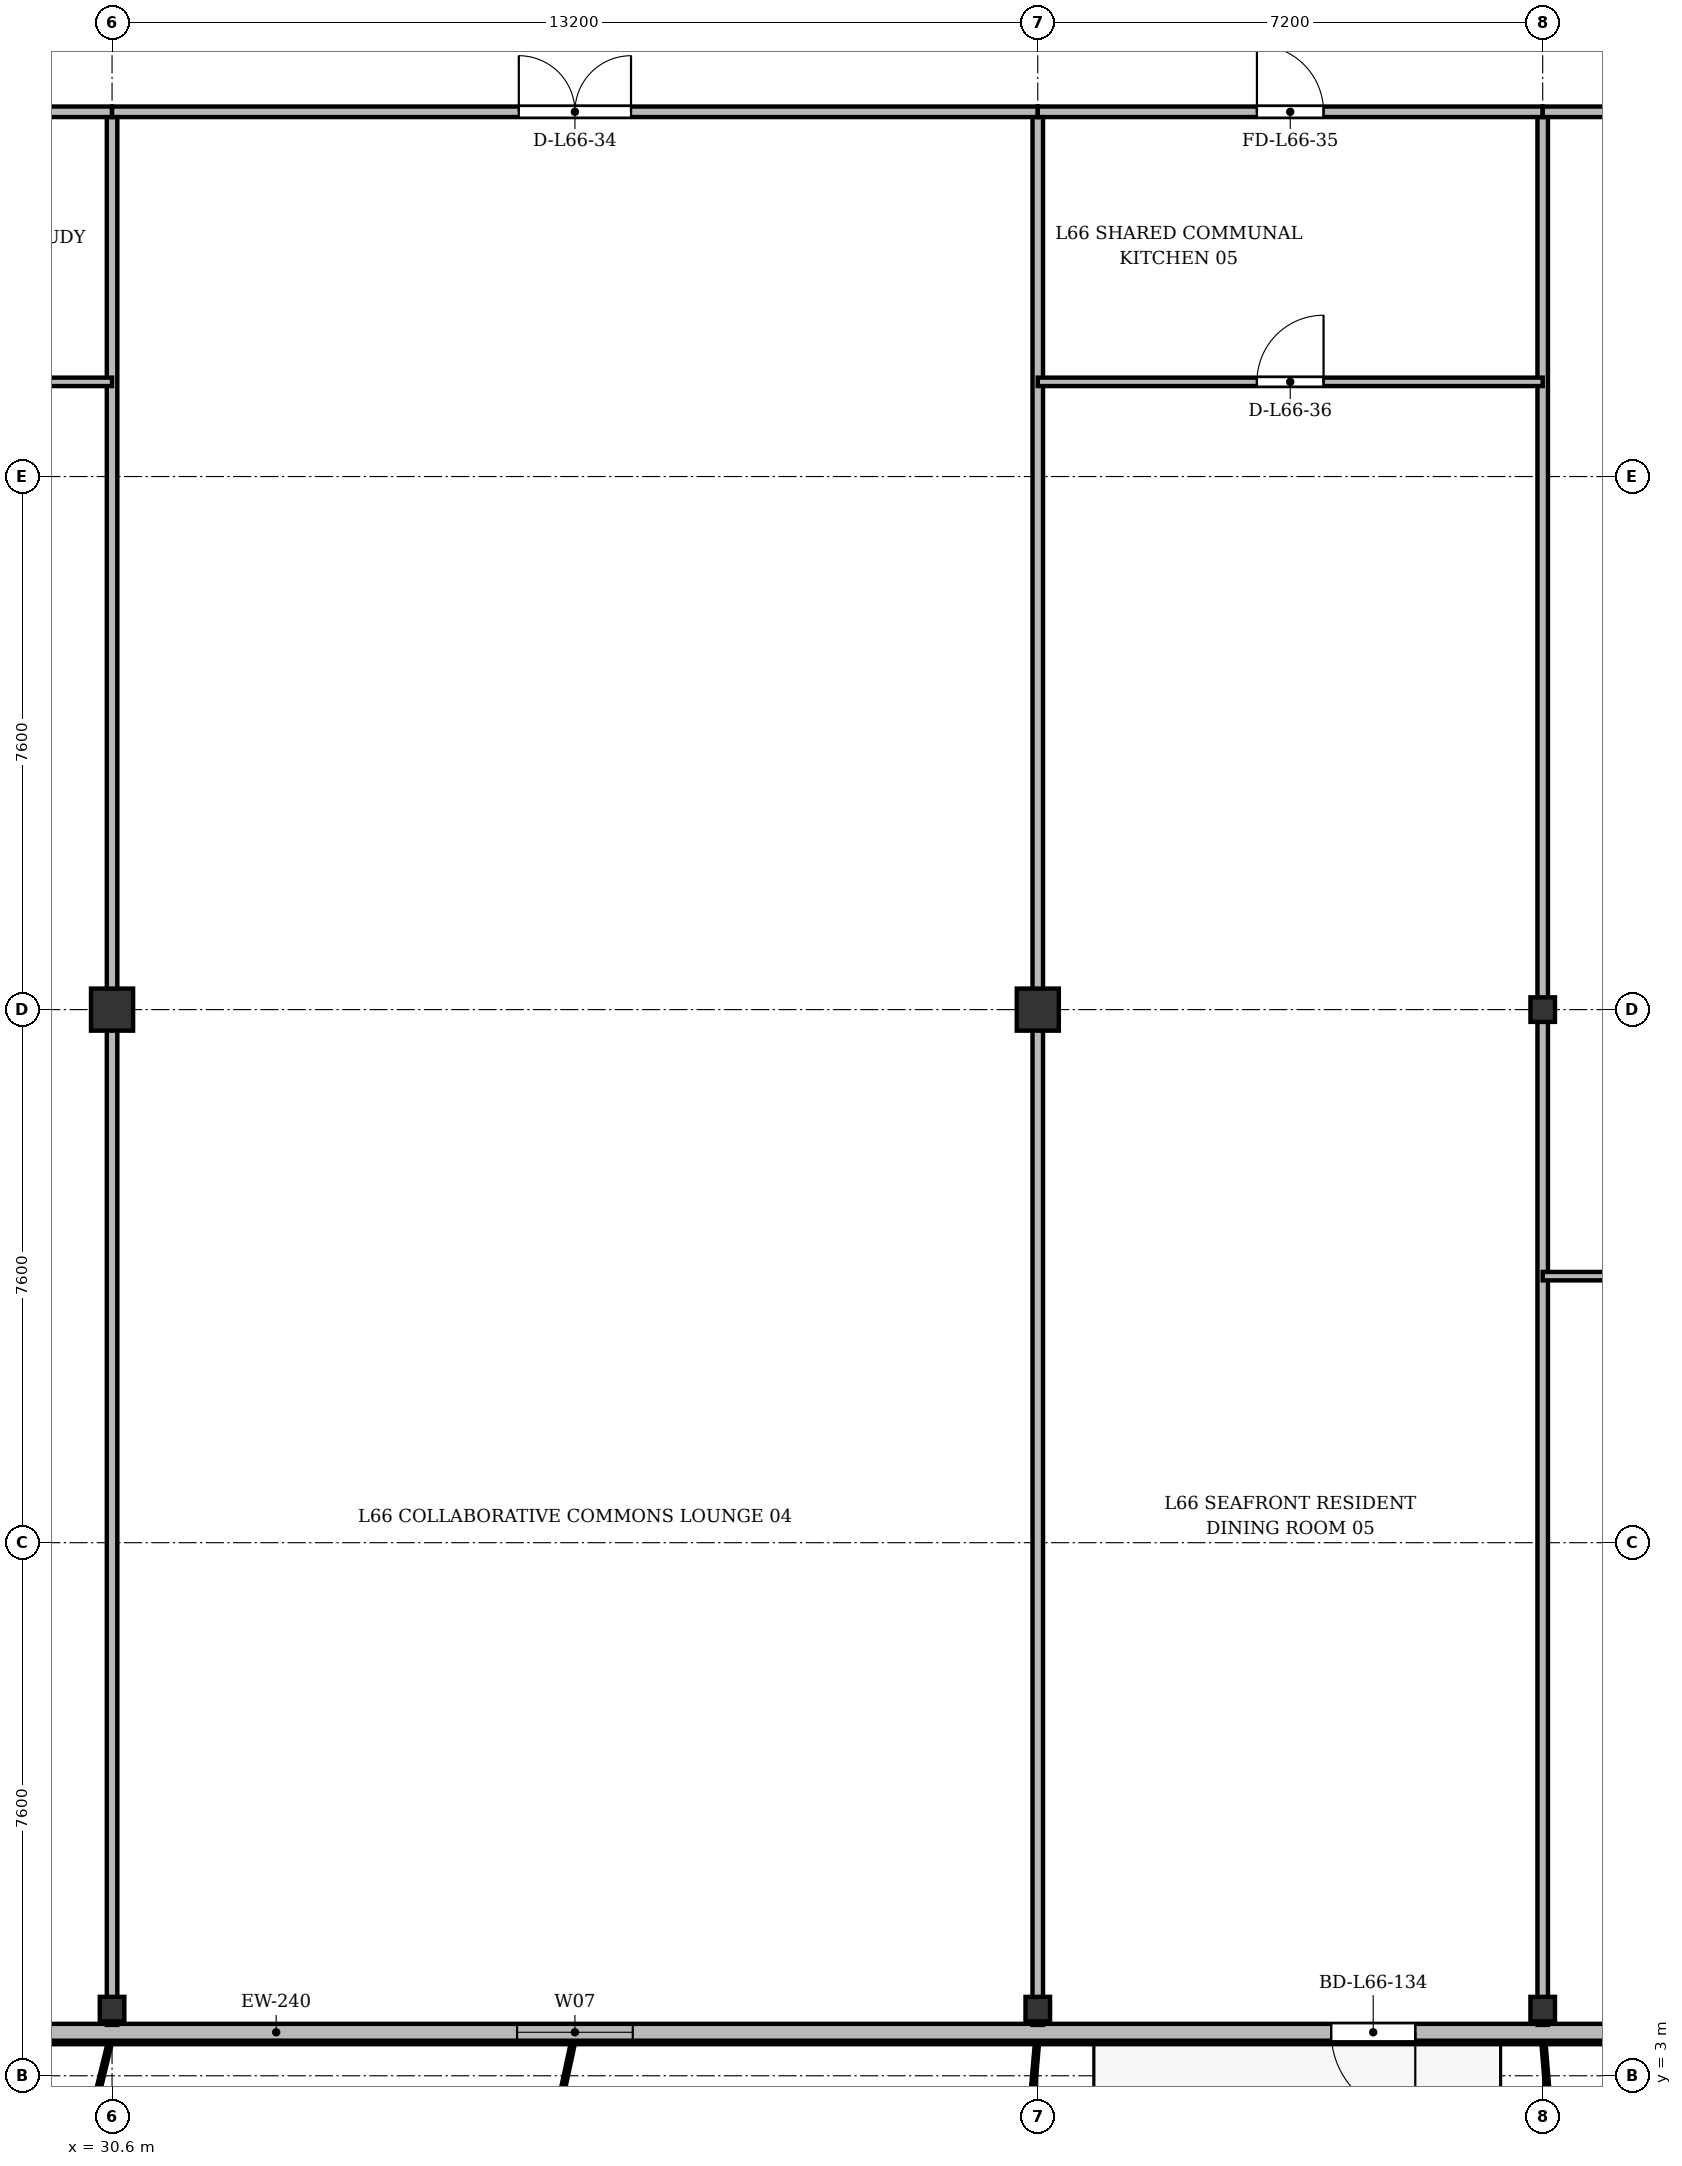
"""IFC4 building model, lengths in metres.
Left out: names, types, materials, properties, quantities, classifications, styles, units other than length and angle.
Written with IfcOpenShell. Run it as: python <this file> out.ifc"""

import sys

from ifc_helpers import new_model, si_unit, direction, frame, frame_2d, origin, origin_2d, place, context, subcontext, project, spatial, rectangle, i_section, extrude, source, transform, mapped, element, fill, save


model = new_model("IFC4")
c1 = context("Model", 3, precision=1e-05, world=origin(), true_north=direction((0.0, 1.0)))
c2 = subcontext(c1, "Body", "Model", "MODEL_VIEW")
j1 = project(units=[si_unit("LENGTHUNIT", "METRE"), si_unit("PLANEANGLEUNIT", "RADIAN")], contexts=[c1])
p1 = place(None, origin())
s1 = spatial("IfcSite", under=j1, at=p1, CompositionType="ELEMENT")
p2 = place(p1, origin())
s2 = spatial("IfcBuilding", under=s1, at=p2, CompositionType="ELEMENT")
p3 = place(p2, frame((0.0, 0.0, 255.9)))
s3 = spatial("IfcBuildingStorey", under=s2, at=p3, CompositionType="ELEMENT", Elevation=255.9)
m1 = source(origin(), c2, "Body", "SweptSolid", [
    extrude(i_section(OverallWidth=0.35, OverallDepth=0.35, WebThickness=0.018, FlangeThickness=0.028, at=origin_2d()), origin(), (0.0, 0.0, 1.0), 3.6),
])
p4 = place(p3, frame((30.6, 3.95, 0.0), z_axis=(0.0, 0.0, 1.0), x_axis=(1.0, 0.0, 0.0)))
e1 = element("IfcColumn", 1, at=p4, inside=s3, PredefinedType="COLUMN", context=c2, shape_type="MappedRepresentation", body=[
    mapped(m1, transform((0.0, 0.0, 0.0), x_axis=(1.0, 0.0, 0.0), y_axis=(0.0, 1.0, 0.0), z_axis=(0.0, 0.0, 1.0), scale=1.0)),
])
m2 = source(origin(), c2, "Body", "SweptSolid", [
    extrude(rectangle(XDim=0.6, YDim=0.6, at=origin_2d()), origin(), (0.0, 0.0, 1.0), 3.6),
])
p5 = place(p3, frame((30.6, 18.2, 0.0), z_axis=(0.0, 0.0, 1.0), x_axis=(1.0, 0.0, 0.0)))
e2 = element("IfcColumn", 2, at=p5, inside=s3, PredefinedType="COLUMN", context=c2, shape_type="MappedRepresentation", body=[
    mapped(m2, transform((0.0, 0.0, 0.0), x_axis=(1.0, 0.0, 0.0), y_axis=(0.0, 1.0, 0.0), z_axis=(0.0, 0.0, 1.0), scale=1.0)),
])
p6 = place(p3, frame((43.8, 3.95, 0.0), z_axis=(0.0, 0.0, 1.0), x_axis=(1.0, 0.0, 0.0)))
e3 = element("IfcColumn", 3, at=p6, inside=s3, PredefinedType="COLUMN", context=c2, shape_type="MappedRepresentation", body=[
    mapped(m1, transform((0.0, 0.0, 0.0), x_axis=(1.0, 0.0, 0.0), y_axis=(0.0, 1.0, 0.0), z_axis=(0.0, 0.0, 1.0), scale=1.0)),
])
p7 = place(p3, frame((43.8, 18.2, 0.0), z_axis=(0.0, 0.0, 1.0), x_axis=(1.0, 0.0, 0.0)))
e4 = element("IfcColumn", 4, at=p7, inside=s3, PredefinedType="COLUMN", context=c2, shape_type="MappedRepresentation", body=[
    mapped(m2, transform((0.0, 0.0, 0.0), x_axis=(1.0, 0.0, 0.0), y_axis=(0.0, 1.0, 0.0), z_axis=(0.0, 0.0, 1.0), scale=1.0)),
])
for number, where, z_axis, x_axis in (
    (5, (51.0, 3.95, 0.0), (0.0, 0.0, 1.0), (1.0, 0.0, 0.0)),
    (6, (51.0, 18.2, 0.0), (0.0, 0.0, 1.0), (1.0, 0.0, 0.0)),
):
    element("IfcColumn", number, at=place(p3, frame(where, z_axis=z_axis, x_axis=x_axis)), inside=s3, PredefinedType="COLUMN", context=c2, shape_type="MappedRepresentation", body=[
        mapped(m1, transform((0.0, 0.0, 0.0), x_axis=(1.0, 0.0, 0.0), y_axis=(0.0, 1.0, 0.0), z_axis=(0.0, 0.0, 1.0), scale=1.0)),
    ])
p8 = place(p3, frame((63.2, 3.62, 0.0), z_axis=(0.0, 0.0, 1.0), x_axis=(-1.0, 0.0, 0.0)))
e7 = element("IfcWall", 7, at=p8, inside=s3, PredefinedType="SOLIDWALL", context=c2, shape_type="SweptSolid", body=[
    extrude(rectangle(XDim=52.0, YDim=0.24, at=frame_2d((26.0, 0.0))), origin(), (0.0, 0.0, 1.0), 3.37),
])
p9 = place(p8, frame((1.145, 0.0, 0.9)))
e8 = element("IfcOpeningElement", 8, at=p9, cuts=e7, PredefinedType="OPENING", context=c2, shape_type="SweptSolid", body=[
    extrude(rectangle(XDim=2.2, YDim=1.8, at=frame_2d((1.1, 0.9))), frame((0.0, 0.13, 0.0), z_axis=(0.0, -1.0, 0.0), x_axis=(1.0, 0.0, 0.0)), (0.0, 0.0, 1.0), 0.26),
])
p10 = place(p8, frame((7.55, 0.0, 0.9)))
e9 = element("IfcOpeningElement", 9, at=p10, cuts=e7, PredefinedType="OPENING", context=c2, shape_type="SweptSolid", body=[
    extrude(rectangle(XDim=1.5, YDim=1.75, at=frame_2d((0.75, 0.875))), frame((0.0, 0.13, 0.0), z_axis=(0.0, -1.0, 0.0), x_axis=(1.0, 0.0, 0.0)), (0.0, 0.0, 1.0), 0.26),
])
p11 = place(p8, frame((14.017, 0.0, 0.0)))
e10 = element("IfcOpeningElement", 10, at=p11, cuts=e7, PredefinedType="OPENING", context=c2, shape_type="SweptSolid", body=[
    extrude(rectangle(XDim=1.2, YDim=2.2, at=frame_2d((0.6, 1.1))), frame((0.0, 0.13, 0.0), z_axis=(0.0, -1.0, 0.0), x_axis=(1.0, 0.0, 0.0)), (0.0, 0.0, 1.0), 0.26),
])
p12 = place(p8, frame((25.175, 0.0, 0.9)))
e11 = element("IfcOpeningElement", 11, at=p12, cuts=e7, PredefinedType="OPENING", context=c2, shape_type="SweptSolid", body=[
    extrude(rectangle(XDim=1.65, YDim=1.85, at=frame_2d((0.825, 0.925))), frame((0.0, 0.13, 0.0), z_axis=(0.0, -1.0, 0.0), x_axis=(1.0, 0.0, 0.0)), (0.0, 0.0, 1.0), 0.26),
])
p13 = place(p8, frame((35.3, 0.0, 0.9)))
e12 = element("IfcOpeningElement", 12, at=p13, cuts=e7, PredefinedType="OPENING", context=c2, shape_type="SweptSolid", body=[
    extrude(rectangle(XDim=1.8, YDim=1.8, at=frame_2d((0.9, 0.9))), frame((0.0, 0.13, 0.0), z_axis=(0.0, -1.0, 0.0), x_axis=(1.0, 0.0, 0.0)), (0.0, 0.0, 1.0), 0.26),
])
p14 = place(p8, frame((45.302, 0.0, 0.0)))
e13 = element("IfcOpeningElement", 13, at=p14, cuts=e7, PredefinedType="OPENING", context=c2, shape_type="SweptSolid", body=[
    extrude(rectangle(XDim=1.2, YDim=2.2, at=frame_2d((0.6, 1.1))), frame((0.0, 0.13, 0.0), z_axis=(0.0, -1.0, 0.0), x_axis=(1.0, 0.0, 0.0)), (0.0, 0.0, 1.0), 0.26),
])
p15 = place(p8, frame((49.005, 0.0, 0.9)))
e14 = element("IfcOpeningElement", 14, at=p15, cuts=e7, PredefinedType="OPENING", context=c2, shape_type="SweptSolid", body=[
    extrude(rectangle(XDim=1.5, YDim=1.75, at=frame_2d((0.75, 0.875))), frame((0.0, 0.13, 0.0), z_axis=(0.0, -1.0, 0.0), x_axis=(1.0, 0.0, 0.0)), (0.0, 0.0, 1.0), 0.26),
])
for number, where, z_axis, x_axis in (
    (15, (30.6, 3.725, 0.0), (0.0, 0.0, 1.0), (0.0, 1.0, 0.0)),
    (16, (43.8, 3.725, 0.0), (0.0, 0.0, 1.0), (0.0, 1.0, 0.0)),
    (17, (51.0, 3.725, 0.0), (0.0, 0.0, 1.0), (0.0, 1.0, 0.0)),
):
    element("IfcWall", number, at=place(p3, frame(where, z_axis=z_axis, x_axis=x_axis)), inside=s3, PredefinedType="PARTITIONING", context=c2, shape_type="SweptSolid", body=[
        extrude(rectangle(XDim=27.275, YDim=0.15, at=frame_2d((13.637, 0.0))), origin(), (0.0, 0.0, 1.0), 2.87),
    ])
p16 = place(p3, frame((23.4, 31.0, 0.0), z_axis=(0.0, 0.0, 1.0), x_axis=(1.0, 0.0, 0.0)))
e18 = element("IfcWall", 18, at=p16, inside=s3, PredefinedType="PARTITIONING", context=c2, shape_type="SweptSolid", body=[
    extrude(rectangle(XDim=7.2, YDim=0.15, at=frame_2d((3.6, 0.0))), origin(), (0.0, 0.0, 1.0), 2.87),
])
p17 = place(p16, frame((3.125, 0.0, 0.0)))
e19 = element("IfcOpeningElement", 19, at=p17, cuts=e18, PredefinedType="OPENING", context=c2, shape_type="SweptSolid", body=[
    extrude(rectangle(XDim=0.95, YDim=2.15, at=frame_2d((0.475, 1.075))), frame((0.0, 0.085, 0.0), z_axis=(0.0, -1.0, 0.0), x_axis=(1.0, 0.0, 0.0)), (0.0, 0.0, 1.0), 0.17),
])
p18 = place(p3, frame((23.4, 27.15, 0.0), z_axis=(0.0, 0.0, 1.0), x_axis=(1.0, 0.0, 0.0)))
e20 = element("IfcWall", 20, at=p18, inside=s3, PredefinedType="PARTITIONING", context=c2, shape_type="SweptSolid", body=[
    extrude(rectangle(XDim=7.2, YDim=0.12, at=frame_2d((3.6, 0.0))), origin(), (0.0, 0.0, 1.0), 2.87),
])
p19 = place(p18, frame((3.125, 0.0, 0.0)))
e21 = element("IfcOpeningElement", 21, at=p19, cuts=e20, PredefinedType="OPENING", context=c2, shape_type="SweptSolid", body=[
    extrude(rectangle(XDim=0.95, YDim=2.15, at=frame_2d((0.475, 1.075))), frame((0.0, 0.07, 0.0), z_axis=(0.0, -1.0, 0.0), x_axis=(1.0, 0.0, 0.0)), (0.0, 0.0, 1.0), 0.14),
])
p20 = place(p3, frame((30.6, 31.0, 0.0), z_axis=(0.0, 0.0, 1.0), x_axis=(1.0, 0.0, 0.0)))
e22 = element("IfcWall", 22, at=p20, inside=s3, PredefinedType="PARTITIONING", context=c2, shape_type="SweptSolid", body=[
    extrude(rectangle(XDim=13.2, YDim=0.15, at=frame_2d((6.6, 0.0))), origin(), (0.0, 0.0, 1.0), 2.87),
])
p21 = place(p20, frame((5.8, 0.0, 0.0)))
e23 = element("IfcOpeningElement", 23, at=p21, cuts=e22, PredefinedType="OPENING", context=c2, shape_type="SweptSolid", body=[
    extrude(rectangle(XDim=1.6, YDim=2.2, at=frame_2d((0.8, 1.1))), frame((0.0, 0.085, 0.0), z_axis=(0.0, -1.0, 0.0), x_axis=(1.0, 0.0, 0.0)), (0.0, 0.0, 1.0), 0.17),
])
p22 = place(p3, frame((43.8, 31.0, 0.0), z_axis=(0.0, 0.0, 1.0), x_axis=(1.0, 0.0, 0.0)))
e24 = element("IfcWall", 24, at=p22, inside=s3, PredefinedType="PARTITIONING", context=c2, shape_type="SweptSolid", body=[
    extrude(rectangle(XDim=7.2, YDim=0.15, at=frame_2d((3.6, 0.0))), origin(), (0.0, 0.0, 1.0), 2.87),
])
p23 = place(p22, frame((3.125, 0.0, 0.0)))
e25 = element("IfcOpeningElement", 25, at=p23, cuts=e24, PredefinedType="OPENING", context=c2, shape_type="SweptSolid", body=[
    extrude(rectangle(XDim=0.95, YDim=2.15, at=frame_2d((0.475, 1.075))), frame((0.0, 0.085, 0.0), z_axis=(0.0, -1.0, 0.0), x_axis=(1.0, 0.0, 0.0)), (0.0, 0.0, 1.0), 0.17),
])
p24 = place(p3, frame((43.8, 27.15, 0.0), z_axis=(0.0, 0.0, 1.0), x_axis=(1.0, 0.0, 0.0)))
e26 = element("IfcWall", 26, at=p24, inside=s3, PredefinedType="PARTITIONING", context=c2, shape_type="SweptSolid", body=[
    extrude(rectangle(XDim=7.2, YDim=0.12, at=frame_2d((3.6, 0.0))), origin(), (0.0, 0.0, 1.0), 2.87),
])
p25 = place(p24, frame((3.125, 0.0, 0.0)))
e27 = element("IfcOpeningElement", 27, at=p25, cuts=e26, PredefinedType="OPENING", context=c2, shape_type="SweptSolid", body=[
    extrude(rectangle(XDim=0.95, YDim=2.15, at=frame_2d((0.475, 1.075))), frame((0.0, 0.07, 0.0), z_axis=(0.0, -1.0, 0.0), x_axis=(1.0, 0.0, 0.0)), (0.0, 0.0, 1.0), 0.14),
])
p26 = place(p3, frame((51.0, 31.0, 0.0), z_axis=(0.0, 0.0, 1.0), x_axis=(1.0, 0.0, 0.0)))
e28 = element("IfcWall", 28, at=p26, inside=s3, PredefinedType="PARTITIONING", context=c2, shape_type="SweptSolid", body=[
    extrude(rectangle(XDim=7.8, YDim=0.15, at=frame_2d((3.9, 0.0))), origin(), (0.0, 0.0, 1.0), 2.87),
])
p27 = place(p26, frame((3.333, 0.0, 0.0)))
e29 = element("IfcOpeningElement", 29, at=p27, cuts=e28, PredefinedType="OPENING", context=c2, shape_type="SweptSolid", body=[
    extrude(rectangle(XDim=0.95, YDim=2.15, at=frame_2d((0.475, 1.075))), frame((0.0, 0.085, 0.0), z_axis=(0.0, -1.0, 0.0), x_axis=(1.0, 0.0, 0.0)), (0.0, 0.0, 1.0), 0.17),
])
p28 = place(p3, frame((51.0, 14.4, 0.0), z_axis=(0.0, 0.0, 1.0), x_axis=(1.0, 0.0, 0.0)))
e30 = element("IfcWall", 30, at=p28, inside=s3, PredefinedType="PARTITIONING", context=c2, shape_type="SweptSolid", body=[
    extrude(rectangle(XDim=7.8, YDim=0.12, at=frame_2d((3.9, 0.0))), origin(), (0.0, 0.0, 1.0), 2.87),
])
p29 = place(p28, frame((3.333, 0.0, 0.0)))
e31 = element("IfcOpeningElement", 31, at=p29, cuts=e30, PredefinedType="OPENING", context=c2, shape_type="SweptSolid", body=[
    extrude(rectangle(XDim=0.95, YDim=2.15, at=frame_2d((0.475, 1.075))), frame((0.0, 0.07, 0.0), z_axis=(0.0, -1.0, 0.0), x_axis=(1.0, 0.0, 0.0)), (0.0, 0.0, 1.0), 0.14),
])
m3 = source(origin(), c2, "Body", "SweptSolid", [
    extrude(rectangle(XDim=1.2, YDim=2.2, at=frame_2d((0.6, 1.1))), frame((0.0, 0.025, 0.0), z_axis=(0.0, -1.0, 0.0), x_axis=(1.0, 0.0, 0.0)), (0.0, 0.0, 1.0), 0.05),
])
p30 = place(p11, origin())
e32 = element("IfcDoor", 32, at=p30, inside=s3, OperationType="SINGLE_SWING_LEFT", PredefinedType="DOOR", context=c2, shape_type="MappedRepresentation", body=[
    mapped(m3, transform((0.0, 0.0, 0.0), x_axis=(1.0, 0.0, 0.0), y_axis=(0.0, 1.0, 0.0), z_axis=(0.0, 0.0, 1.0), scale=1.0)),
])
fill(e10, e32)
m4 = source(origin(), c2, "Body", "SweptSolid", [
    extrude(rectangle(XDim=1.65, YDim=1.85, at=frame_2d((0.825, 0.925))), frame((0.0, 0.03, 0.0), z_axis=(0.0, -1.0, 0.0), x_axis=(1.0, 0.0, 0.0)), (0.0, 0.0, 1.0), 0.06),
])
p31 = place(p12, origin())
e33 = element("IfcWindow", 33, at=p31, inside=s3, PartitioningType="SINGLE_PANEL", PredefinedType="WINDOW", context=c2, shape_type="MappedRepresentation", body=[
    mapped(m4, transform((0.0, 0.0, 0.0), x_axis=(1.0, 0.0, 0.0), y_axis=(0.0, 1.0, 0.0), z_axis=(0.0, 0.0, 1.0), scale=1.0)),
])
fill(e11, e33)
m5 = source(origin(), c2, "Body", "SweptSolid", [
    extrude(rectangle(XDim=1.6, YDim=2.2, at=frame_2d((0.8, 1.1))), frame((0.0, 0.025, 0.0), z_axis=(0.0, -1.0, 0.0), x_axis=(1.0, 0.0, 0.0)), (0.0, 0.0, 1.0), 0.05),
])
p32 = place(p21, origin())
e34 = element("IfcDoor", 34, at=p32, inside=s3, OperationType="DOUBLE_DOOR_SINGLE_SWING", PredefinedType="DOOR", context=c2, shape_type="MappedRepresentation", body=[
    mapped(m5, transform((0.0, 0.0, 0.0), x_axis=(1.0, 0.0, 0.0), y_axis=(0.0, 1.0, 0.0), z_axis=(0.0, 0.0, 1.0), scale=1.0)),
])
fill(e23, e34)
m6 = source(origin(), c2, "Body", "SweptSolid", [
    extrude(rectangle(XDim=0.95, YDim=2.15, at=frame_2d((0.475, 1.075))), frame((0.0, 0.025, 0.0), z_axis=(0.0, -1.0, 0.0), x_axis=(1.0, 0.0, 0.0)), (0.0, 0.0, 1.0), 0.05),
])
p33 = place(p23, origin())
e35 = element("IfcDoor", 35, at=p33, inside=s3, OperationType="SINGLE_SWING_LEFT", PredefinedType="DOOR", context=c2, shape_type="MappedRepresentation", body=[
    mapped(m6, transform((0.0, 0.0, 0.0), x_axis=(1.0, 0.0, 0.0), y_axis=(0.0, 1.0, 0.0), z_axis=(0.0, 0.0, 1.0), scale=1.0)),
])
fill(e25, e35)
p34 = place(p25, origin())
e36 = element("IfcDoor", 36, at=p34, inside=s3, OperationType="SINGLE_SWING_RIGHT", PredefinedType="DOOR", context=c2, shape_type="MappedRepresentation", body=[
    mapped(m6, transform((0.0, 0.0, 0.0), x_axis=(1.0, 0.0, 0.0), y_axis=(0.0, 1.0, 0.0), z_axis=(0.0, 0.0, 1.0), scale=1.0)),
])
fill(e27, e36)
save(model, sys.argv[1])
